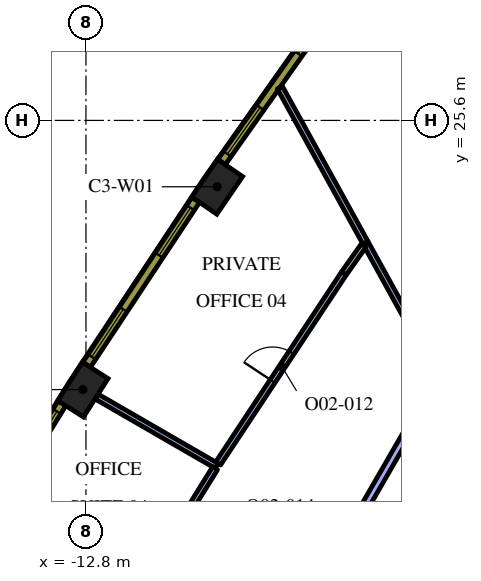
"""IFC4 building model, lengths in metres.
Left out: names, types, materials, properties, quantities, classifications, styles, units other than length and angle.
Written with IfcOpenShell. Run it as: python <this file> out.ifc"""

import sys

from ifc_helpers import new_model, si_unit, direction, frame, frame_2d, origin, origin_2d, place, context, subcontext, project, spatial, rectangle, extrude, element, fill, save


model = new_model("IFC4")
c1 = context("Model", 3, precision=1e-05, world=origin(), true_north=direction((0.0, 1.0)))
c2 = subcontext(c1, "Body", "Model", "MODEL_VIEW")
j1 = project(units=[si_unit("LENGTHUNIT", "METRE"), si_unit("PLANEANGLEUNIT", "RADIAN")], contexts=[c1])
p1 = place(None, origin())
s1 = spatial("IfcSite", under=j1, at=p1, CompositionType="ELEMENT")
p2 = place(p1, origin())
s2 = spatial("IfcBuilding", under=s1, at=p2, CompositionType="ELEMENT")
p3 = place(p2, frame((0.0, 0.0, 162.6)))
s3 = spatial("IfcBuildingStorey", under=s2, at=p3, CompositionType="ELEMENT", Elevation=162.6)
for number, where, z_axis, x_axis in (
    (1, (-9.348, 23.854, 0.0), (0.0, 0.0, 1.0), (-0.565, -0.825, 0.0)),
    (2, (-12.88, 18.517, 0.0), (0.0, 0.0, 1.0), (-0.539, -0.842, 0.0)),
):
    element("IfcColumn", number, at=place(p3, frame(where, z_axis=z_axis, x_axis=x_axis)), inside=s3, PredefinedType="COLUMN", context=c2, shape_type="SweptSolid", body=[
        extrude(rectangle(XDim=1.2, YDim=0.8, at=origin_2d()), origin(), (0.0, 0.0, 1.0), 4.2),
    ])
p4 = place(p3, frame((-5.442, 22.374, 0.0), z_axis=(0.0, 0.0, 1.0), x_axis=(-0.482987550425, 0.875627218703, 0.0)))
e3 = element("IfcWall", 3, at=p4, inside=s3, PredefinedType="PARTITIONING", context=c2, shape_type="SweptSolid", body=[
    extrude(rectangle(XDim=4.672, YDim=0.15, at=frame_2d((2.336, 0.0))), origin(), (0.0, 0.0, 1.0), 3.15),
])
p5 = place(p3, frame((-3.47, 18.8, 0.0), z_axis=(0.0, 0.0, 1.0), x_axis=(-0.482974768035, 0.875634269225, 0.0)))
e4 = element("IfcWall", 4, at=p5, inside=s3, PredefinedType="PARTITIONING", context=c2, shape_type="SweptSolid", body=[
    extrude(rectangle(XDim=4.09, YDim=0.15, at=frame_2d((2.045, 0.0))), origin(), (0.0, 0.0, 1.0), 3.15),
])
p6 = place(p3, frame((-9.363, 16.511, 0.0), z_axis=(0.0, 0.0, 1.0), x_axis=(-0.866006134298, 0.500033374244, 0.0)))
e5 = element("IfcWall", 5, at=p6, inside=s3, PredefinedType="PARTITIONING", context=c2, shape_type="SweptSolid", body=[
    extrude(rectangle(XDim=3.648, YDim=0.15, at=frame_2d((1.824, 0.0))), origin(), (0.0, 0.0, 1.0), 3.15),
])
p7 = place(p3, frame((-5.492, 22.31, 0.0), z_axis=(0.0, 0.0, 1.0), x_axis=(-0.576980663571, -0.816757806124, 0.0)))
e6 = element("IfcWall", 6, at=p7, inside=s3, PredefinedType="PARTITIONING", context=c2, shape_type="SweptSolid", body=[
    extrude(rectangle(XDim=0.902, YDim=0.15, at=frame_2d((0.451, 0.0))), origin(), (0.0, 0.0, 1.0), 3.15),
])
p8 = place(p3, frame((-9.322, 16.573, 0.0), z_axis=(0.0, 0.0, 1.0), x_axis=(0.551906048292, 0.833906298009, 0.0)))
e7 = element("IfcWall", 7, at=p8, inside=s3, PredefinedType="PARTITIONING", context=c2, shape_type="SweptSolid", body=[
    extrude(rectangle(XDim=5.995, YDim=0.15, at=frame_2d((2.998, 0.0))), origin(), (0.0, 0.0, 1.0), 3.15),
])
p9 = place(p8, frame((2.595, 0.0, 0.0)))
e8 = element("IfcOpeningElement", 8, at=p9, cuts=e7, PredefinedType="OPENING", context=c2, shape_type="SweptSolid", body=[
    extrude(rectangle(XDim=0.9, YDim=2.1, at=frame_2d((0.45, 1.05))), frame((0.0, 0.085, 0.0), z_axis=(0.0, -1.0, 0.0), x_axis=(1.0, 0.0, 0.0)), (0.0, 0.0, 1.0), 0.17),
])
p10 = place(p3, frame((-12.779, 11.002, 0.0), z_axis=(0.0, 0.0, 1.0), x_axis=(0.527026092571, 0.849849102929, 0.0)))
e9 = element("IfcWall", 9, at=p10, inside=s3, PredefinedType="PARTITIONING", context=c2, shape_type="SweptSolid", body=[
    extrude(rectangle(XDim=6.407, YDim=0.15, at=frame_2d((3.204, 0.0))), origin(), (0.0, 0.0, 1.0), 3.15),
])
p11 = place(p10, frame((2.707, 0.0, 0.0)))
e10 = element("IfcOpeningElement", 10, at=p11, cuts=e9, PredefinedType="OPENING", context=c2, shape_type="SweptSolid", body=[
    extrude(rectangle(XDim=0.9, YDim=2.1, at=frame_2d((0.45, 1.05))), frame((0.0, 0.085, 0.0), z_axis=(0.0, -1.0, 0.0), x_axis=(1.0, 0.0, 0.0)), (0.0, 0.0, 1.0), 0.17),
])
p12 = place(p3, frame((-3.522, 18.8, 0.0), z_axis=(0.0, 0.0, 1.0), x_axis=(-0.500015783377, -0.866016291056, 0.0)))
e11 = element("IfcWall", 11, at=p12, inside=s3, PredefinedType="PARTITIONING", context=c2, shape_type="SweptSolid", body=[
    extrude(rectangle(XDim=9.99, YDim=0.2, at=frame_2d((4.995, 0.0))), origin(), (0.0, 0.0, 1.0), 3.15),
])
p13 = place(p12, frame((4.5, 0.0, 0.0)))
e12 = element("IfcOpeningElement", 12, at=p13, cuts=e11, PredefinedType="OPENING", context=c2, shape_type="SweptSolid", body=[
    extrude(rectangle(XDim=1.0, YDim=2.1, at=frame_2d((0.5, 1.05))), frame((0.0, 0.11, 0.0), z_axis=(0.0, -1.0, 0.0), x_axis=(1.0, 0.0, 0.0)), (0.0, 0.0, 1.0), 0.22),
])
p14 = place(p3, frame((-6.223, 28.762, 0.0), z_axis=(0.0, 0.0, 1.0), x_axis=(-0.577115207679, -0.816662743772, 0.0)))
e13 = element("IfcWall", 13, at=p14, inside=s3, PredefinedType="SOLIDWALL", context=c2, shape_type="SweptSolid", body=[
    extrude(rectangle(XDim=5.213, YDim=0.24, at=frame_2d((2.606, 0.0))), origin(), (0.0, 0.0, 1.0), 3.95),
])
p15 = place(p14, frame((0.221, 0.0, 0.9)))
e14 = element("IfcOpeningElement", 14, at=p15, cuts=e13, PredefinedType="OPENING", context=c2, shape_type="SweptSolid", body=[
    extrude(rectangle(XDim=1.5, YDim=2.55, at=frame_2d((0.75, 1.275))), frame((0.0, 0.13, 0.0), z_axis=(0.0, -1.0, 0.0), x_axis=(1.0, 0.0, 0.0)), (0.0, 0.0, 1.0), 0.26),
])
p16 = place(p14, frame((3.452, 0.0, 0.9)))
e15 = element("IfcOpeningElement", 15, at=p16, cuts=e13, PredefinedType="OPENING", context=c2, shape_type="SweptSolid", body=[
    extrude(rectangle(XDim=1.5, YDim=2.55, at=frame_2d((0.75, 1.275))), frame((0.0, 0.13, 0.0), z_axis=(0.0, -1.0, 0.0), x_axis=(1.0, 0.0, 0.0)), (0.0, 0.0, 1.0), 0.26),
])
p17 = place(p3, frame((-9.911, 23.51, 0.0), z_axis=(0.0, 0.0, 1.0), x_axis=(-0.551892811511, -0.833915058386, 0.0)))
e16 = element("IfcWall", 16, at=p17, inside=s3, PredefinedType="SOLIDWALL", context=c2, shape_type="SweptSolid", body=[
    extrude(rectangle(XDim=5.204, YDim=0.24, at=frame_2d((2.602, 0.0))), origin(), (0.0, 0.0, 1.0), 3.95),
])
p18 = place(p17, frame((0.248, 0.0, 0.9)))
e17 = element("IfcOpeningElement", 17, at=p18, cuts=e16, PredefinedType="OPENING", context=c2, shape_type="SweptSolid", body=[
    extrude(rectangle(XDim=1.5, YDim=2.55, at=frame_2d((0.75, 1.275))), frame((0.0, 0.13, 0.0), z_axis=(0.0, -1.0, 0.0), x_axis=(1.0, 0.0, 0.0)), (0.0, 0.0, 1.0), 0.26),
])
p19 = place(p17, frame((3.455, 0.0, 0.9)))
e18 = element("IfcOpeningElement", 18, at=p19, cuts=e16, PredefinedType="OPENING", context=c2, shape_type="SweptSolid", body=[
    extrude(rectangle(XDim=1.5, YDim=2.55, at=frame_2d((0.75, 1.275))), frame((0.0, 0.13, 0.0), z_axis=(0.0, -1.0, 0.0), x_axis=(1.0, 0.0, 0.0)), (0.0, 0.0, 1.0), 0.26),
])
p20 = place(p3, frame((-13.433, 18.156, 0.0), z_axis=(0.0, 0.0, 1.0), x_axis=(-0.526197926587, -0.850362124072, 0.0)))
e19 = element("IfcWall", 19, at=p20, inside=s3, PredefinedType="SOLIDWALL", context=c2, shape_type="SweptSolid", body=[
    extrude(rectangle(XDim=5.203, YDim=0.24, at=frame_2d((2.602, 0.0))), origin(), (0.0, 0.0, 1.0), 3.95),
])
p21 = place(p20, frame((0.248, 0.0, 0.9)))
e20 = element("IfcOpeningElement", 20, at=p21, cuts=e19, PredefinedType="OPENING", context=c2, shape_type="SweptSolid", body=[
    extrude(rectangle(XDim=1.5, YDim=2.55, at=frame_2d((0.75, 1.275))), frame((0.0, 0.13, 0.0), z_axis=(0.0, -1.0, 0.0), x_axis=(1.0, 0.0, 0.0)), (0.0, 0.0, 1.0), 0.26),
])
p22 = place(p20, frame((3.455, 0.0, 0.9)))
e21 = element("IfcOpeningElement", 21, at=p22, cuts=e19, PredefinedType="OPENING", context=c2, shape_type="SweptSolid", body=[
    extrude(rectangle(XDim=1.5, YDim=2.55, at=frame_2d((0.75, 1.275))), frame((0.0, 0.13, 0.0), z_axis=(0.0, -1.0, 0.0), x_axis=(1.0, 0.0, 0.0)), (0.0, 0.0, 1.0), 0.26),
])
p23 = place(p9, origin())
e22 = element("IfcDoor", 22, at=p23, inside=s3, OperationType="SINGLE_SWING_RIGHT", PredefinedType="DOOR", context=c2, shape_type="SweptSolid", body=[
    extrude(rectangle(XDim=0.9, YDim=2.1, at=frame_2d((0.45, 1.05))), frame((0.0, 0.025, 0.0), z_axis=(0.0, -1.0, 0.0), x_axis=(1.0, 0.0, 0.0)), (0.0, 0.0, 1.0), 0.05),
])
fill(e8, e22)
p24 = place(p15, origin())
e23 = element("IfcWindow", 23, at=p24, inside=s3, PartitioningType="SINGLE_PANEL", PredefinedType="WINDOW", context=c2, shape_type="SweptSolid", body=[
    extrude(rectangle(XDim=1.5, YDim=2.55, at=frame_2d((0.75, 1.275))), frame((0.0, 0.04, 0.0), z_axis=(0.0, -1.0, 0.0), x_axis=(1.0, 0.0, 0.0)), (0.0, 0.0, 1.0), 0.06),
])
fill(e14, e23)
p25 = place(p16, origin())
e24 = element("IfcWindow", 24, at=p25, inside=s3, PartitioningType="SINGLE_PANEL", PredefinedType="WINDOW", context=c2, shape_type="SweptSolid", body=[
    extrude(rectangle(XDim=1.5, YDim=2.55, at=frame_2d((0.75, 1.275))), frame((0.0, 0.04, 0.0), z_axis=(0.0, -1.0, 0.0), x_axis=(1.0, 0.0, 0.0)), (0.0, 0.0, 1.0), 0.06),
])
fill(e15, e24)
p26 = place(p18, origin())
e25 = element("IfcWindow", 25, at=p26, inside=s3, PartitioningType="SINGLE_PANEL", PredefinedType="WINDOW", context=c2, shape_type="SweptSolid", body=[
    extrude(rectangle(XDim=1.5, YDim=2.55, at=frame_2d((0.75, 1.275))), frame((0.0, 0.04, 0.0), z_axis=(0.0, -1.0, 0.0), x_axis=(1.0, 0.0, 0.0)), (0.0, 0.0, 1.0), 0.06),
])
fill(e17, e25)
p27 = place(p19, origin())
e26 = element("IfcWindow", 26, at=p27, inside=s3, PartitioningType="SINGLE_PANEL", PredefinedType="WINDOW", context=c2, shape_type="SweptSolid", body=[
    extrude(rectangle(XDim=1.5, YDim=2.55, at=frame_2d((0.75, 1.275))), frame((0.0, 0.04, 0.0), z_axis=(0.0, -1.0, 0.0), x_axis=(1.0, 0.0, 0.0)), (0.0, 0.0, 1.0), 0.06),
])
fill(e18, e26)
p28 = place(p21, origin())
e27 = element("IfcWindow", 27, at=p28, inside=s3, PartitioningType="SINGLE_PANEL", PredefinedType="WINDOW", context=c2, shape_type="SweptSolid", body=[
    extrude(rectangle(XDim=1.5, YDim=2.55, at=frame_2d((0.75, 1.275))), frame((0.0, 0.04, 0.0), z_axis=(0.0, -1.0, 0.0), x_axis=(1.0, 0.0, 0.0)), (0.0, 0.0, 1.0), 0.06),
])
fill(e20, e27)
save(model, sys.argv[1])
